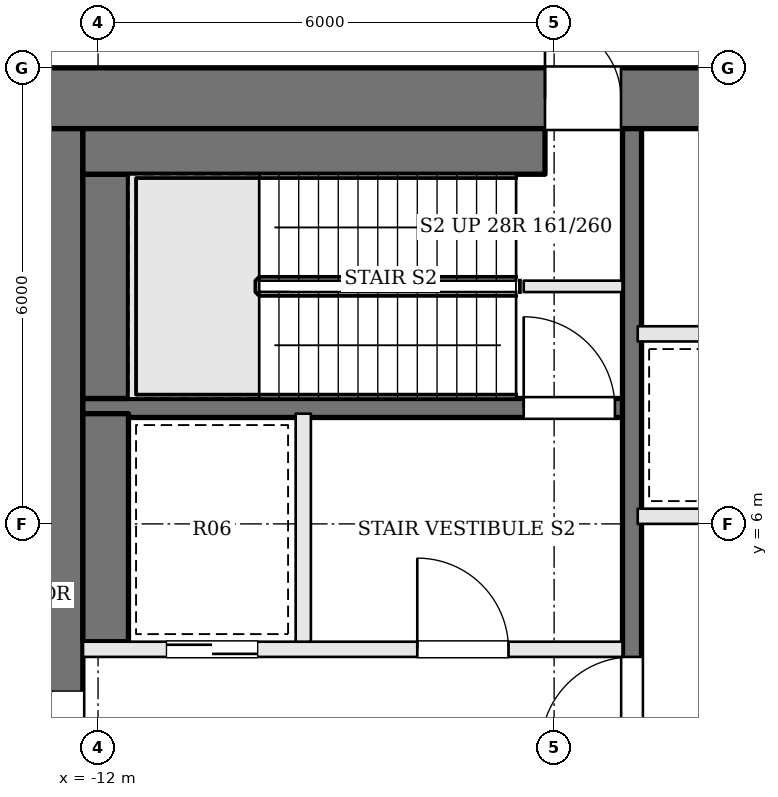
"""IFC4 building model, lengths in metres.
Left out: names, types, materials, properties, quantities, classifications, styles, units other than length and angle.
Written with IfcOpenShell. Run it as: python <this file> out.ifc"""

import sys

from ifc_helpers import new_model, si_unit, direction, frame, frame_2d, origin, place, context, subcontext, project, spatial, rectangle, extrude, element, fill, save


model = new_model("IFC4")
c1 = context("Model", 3, precision=1e-05, world=origin(), true_north=direction((0.0, 1.0)))
c2 = subcontext(c1, "Body", "Model", "MODEL_VIEW")
j1 = project(units=[si_unit("LENGTHUNIT", "METRE"), si_unit("PLANEANGLEUNIT", "RADIAN")], contexts=[c1])
p1 = place(None, origin())
s1 = spatial("IfcSite", under=j1, at=p1, CompositionType="ELEMENT")
p2 = place(p1, origin())
s2 = spatial("IfcBuilding", under=s1, at=p2, CompositionType="ELEMENT")
p3 = place(p2, frame((0.0, 0.0, 216.9)))
s3 = spatial("IfcBuildingStorey", under=s2, at=p3, CompositionType="ELEMENT", Elevation=216.9)
p4 = place(p3, frame((-13.0, 11.6, 0.0), z_axis=(0.0, 0.0, 1.0), x_axis=(1.0, 0.0, 0.0)))
e1 = element("IfcWall", 1, at=p4, inside=s3, PredefinedType="SHEAR", context=c2, shape_type="SweptSolid", body=[
    extrude(rectangle(XDim=26.0, YDim=0.8, at=frame_2d((13.0, 0.0))), origin(), (0.0, 0.0, 1.0), 4.5),
])
p5 = place(p4, frame((8.975, 0.0, 0.0)))
e2 = element("IfcOpeningElement", 2, at=p5, cuts=e1, PredefinedType="OPENING", context=c2, shape_type="SweptSolid", body=[
    extrude(rectangle(XDim=0.7, YDim=2.1, at=frame_2d((0.35, 1.05))), frame((0.0, 0.41, 0.0), z_axis=(0.0, -1.0, 0.0), x_axis=(1.0, 0.0, 0.0)), (0.0, 0.0, 1.0), 0.82),
])
p6 = place(p4, frame((11.575, 0.0, 0.0)))
e3 = element("IfcOpeningElement", 3, at=p6, cuts=e1, PredefinedType="OPENING", context=c2, shape_type="SweptSolid", body=[
    extrude(rectangle(XDim=1.2, YDim=2.1, at=frame_2d((0.6, 1.05))), frame((0.0, 0.41, 0.0), z_axis=(0.0, -1.0, 0.0), x_axis=(1.0, 0.0, 0.0)), (0.0, 0.0, 1.0), 0.82),
])
p7 = place(p4, frame((14.675, 0.0, 0.0)))
e4 = element("IfcOpeningElement", 4, at=p7, cuts=e1, PredefinedType="OPENING", context=c2, shape_type="SweptSolid", body=[
    extrude(rectangle(XDim=0.7, YDim=2.1, at=frame_2d((0.35, 1.05))), frame((0.0, 0.41, 0.0), z_axis=(0.0, -1.0, 0.0), x_axis=(1.0, 0.0, 0.0)), (0.0, 0.0, 1.0), 0.82),
])
p8 = place(p4, frame((16.725, 0.0, 0.0)))
e5 = element("IfcOpeningElement", 5, at=p8, cuts=e1, PredefinedType="OPENING", context=c2, shape_type="SweptSolid", body=[
    extrude(rectangle(XDim=0.7, YDim=2.1, at=frame_2d((0.35, 1.05))), frame((0.0, 0.41, 0.0), z_axis=(0.0, -1.0, 0.0), x_axis=(1.0, 0.0, 0.0)), (0.0, 0.0, 1.0), 0.82),
])
p9 = place(p4, frame((6.88, 0.0, 0.0)))
e6 = element("IfcOpeningElement", 6, at=p9, cuts=e1, PredefinedType="OPENING", context=c2, shape_type="SweptSolid", body=[
    extrude(rectangle(XDim=1.0, YDim=2.1, at=frame_2d((0.5, 1.05))), frame((0.0, 0.41, 0.0), z_axis=(0.0, -1.0, 0.0), x_axis=(1.0, 0.0, 0.0)), (0.0, 0.0, 1.0), 0.82),
])
p10 = place(p4, frame((18.12, 0.0, 0.0)))
e7 = element("IfcOpeningElement", 7, at=p10, cuts=e1, PredefinedType="OPENING", context=c2, shape_type="SweptSolid", body=[
    extrude(rectangle(XDim=1.0, YDim=2.1, at=frame_2d((0.5, 1.05))), frame((0.0, 0.41, 0.0), z_axis=(0.0, -1.0, 0.0), x_axis=(1.0, 0.0, 0.0)), (0.0, 0.0, 1.0), 0.82),
])
p11 = place(p3, frame((-12.6, -2.2, 0.0), z_axis=(0.0, 0.0, 1.0), x_axis=(0.0, 1.0, 0.0)))
e8 = element("IfcWall", 8, at=p11, inside=s3, PredefinedType="SHEAR", context=c2, shape_type="SweptSolid", body=[
    extrude(rectangle(XDim=13.4, YDim=0.8, at=frame_2d((6.7, 0.0))), origin(), (0.0, 0.0, 1.0), 4.5),
])
p12 = place(p11, frame((4.2, 0.0, 0.0)))
e9 = element("IfcOpeningElement", 9, at=p12, cuts=e8, PredefinedType="OPENING", context=c2, shape_type="SweptSolid", body=[
    extrude(rectangle(XDim=1.8, YDim=2.1, at=frame_2d((0.9, 1.05))), frame((0.0, 0.41, 0.0), z_axis=(0.0, -1.0, 0.0), x_axis=(1.0, 0.0, 0.0)), (0.0, 0.0, 1.0), 0.82),
])
p13 = place(p3, frame((-6.4, 9.125, 0.0), z_axis=(0.0, 0.0, 1.0), x_axis=(1.0, 0.0, 0.0)))
e10 = element("IfcWall", 10, at=p13, inside=s3, PredefinedType="SOLIDWALL", context=c2, shape_type="SweptSolid", body=[
    extrude(rectangle(XDim=1.3, YDim=0.15, at=frame_2d((0.65, 0.0))), origin(), (0.0, 0.0, 1.0), 4.3),
])
p14 = place(p3, frame((-12.2, 4.35, 0.0), z_axis=(0.0, 0.0, 1.0), x_axis=(1.0, 0.0, 0.0)))
e11 = element("IfcWall", 11, at=p14, inside=s3, PredefinedType="SOLIDWALL", context=c2, shape_type="SweptSolid", body=[
    extrude(rectangle(XDim=7.1, YDim=0.2, at=frame_2d((3.55, 0.0))), origin(), (0.0, 0.0, 1.0), 4.3),
])
p15 = place(p14, frame((4.4, 0.0, 0.0)))
e12 = element("IfcOpeningElement", 12, at=p15, cuts=e11, PredefinedType="OPENING", context=c2, shape_type="SweptSolid", body=[
    extrude(rectangle(XDim=1.2, YDim=2.1, at=frame_2d((0.6, 1.05))), frame((0.0, 0.11, 0.0), z_axis=(0.0, -1.0, 0.0), x_axis=(1.0, 0.0, 0.0)), (0.0, 0.0, 1.0), 0.22),
])
p16 = place(p14, frame((1.1, 0.0, 0.0)))
e13 = element("IfcOpeningElement", 13, at=p16, cuts=e11, PredefinedType="OPENING", context=c2, shape_type="SweptSolid", body=[
    extrude(rectangle(XDim=1.2, YDim=2.1, at=frame_2d((0.6, 1.05))), frame((0.0, 0.11, 0.0), z_axis=(0.0, -1.0, 0.0), x_axis=(1.0, 0.0, 0.0)), (0.0, 0.0, 1.0), 0.22),
])
p17 = place(p3, frame((-12.2, 7.525, 0.0), z_axis=(0.0, 0.0, 1.0), x_axis=(1.0, 0.0, 0.0)))
e14 = element("IfcWall", 14, at=p17, inside=s3, PredefinedType="SOLIDWALL", context=c2, shape_type="SweptSolid", body=[
    extrude(rectangle(XDim=7.1, YDim=0.25, at=frame_2d((3.55, 0.0))), origin(), (0.0, 0.0, 1.0), 4.3),
])
p18 = place(p17, frame((5.8, 0.0, 0.0)))
e15 = element("IfcOpeningElement", 15, at=p18, cuts=e14, PredefinedType="OPENING", context=c2, shape_type="SweptSolid", body=[
    extrude(rectangle(XDim=1.2, YDim=2.1, at=frame_2d((0.6, 1.05))), frame((0.0, 0.135, 0.0), z_axis=(0.0, -1.0, 0.0), x_axis=(1.0, 0.0, 0.0)), (0.0, 0.0, 1.0), 0.27),
])
p19 = place(p3, frame((-9.3, 4.45, 0.0), z_axis=(0.0, 0.0, 1.0), x_axis=(0.0, 1.0, 0.0)))
e16 = element("IfcWall", 16, at=p19, inside=s3, PredefinedType="SOLIDWALL", context=c2, shape_type="SweptSolid", body=[
    extrude(rectangle(XDim=3.0, YDim=0.2, at=frame_2d((1.5, 0.0))), origin(), (0.0, 0.0, 1.0), 4.3),
])
p20 = place(p3, frame((-4.975, -2.2, 0.0), z_axis=(0.0, 0.0, 1.0), x_axis=(0.0, 1.0, 0.0)))
e17 = element("IfcWall", 17, at=p20, inside=s3, PredefinedType="SOLIDWALL", context=c2, shape_type="SweptSolid", body=[
    extrude(rectangle(XDim=13.4, YDim=0.25, at=frame_2d((6.7, 0.0))), origin(), (0.0, 0.0, 1.0), 4.3),
])
p21 = place(p20, frame((5.25, 0.0, 0.0)))
e18 = element("IfcOpeningElement", 18, at=p21, cuts=e17, PredefinedType="OPENING", context=c2, shape_type="SweptSolid", body=[
    extrude(rectangle(XDim=1.2, YDim=2.1, at=frame_2d((0.6, 1.05))), frame((0.0, 0.135, 0.0), z_axis=(0.0, -1.0, 0.0), x_axis=(1.0, 0.0, 0.0)), (0.0, 0.0, 1.0), 0.27),
])
p22 = place(p3, frame((-11.9, 4.45, 0.0), z_axis=(0.0, 0.0, 1.0), x_axis=(0.0, 1.0, 0.0)))
e19 = element("IfcWall", 19, at=p22, inside=s3, PredefinedType="SOLIDWALL", context=c2, shape_type="SweptSolid", body=[
    extrude(rectangle(XDim=3.0, YDim=0.6, at=frame_2d((1.5, 0.0))), origin(), (0.0, 0.0, 1.0), 4.3),
])
p23 = place(p3, frame((-11.9, 7.65, 0.0), z_axis=(0.0, 0.0, 1.0), x_axis=(0.0, 1.0, 0.0)))
e20 = element("IfcWall", 20, at=p23, inside=s3, PredefinedType="SOLIDWALL", context=c2, shape_type="SweptSolid", body=[
    extrude(rectangle(XDim=2.95, YDim=0.6, at=frame_2d((1.475, 0.0))), origin(), (0.0, 0.0, 1.0), 4.3),
])
p24 = place(p3, frame((-12.2, 10.9, 0.0), z_axis=(0.0, 0.0, 1.0), x_axis=(1.0, 0.0, 0.0)))
e21 = element("IfcWall", 21, at=p24, inside=s3, PredefinedType="SOLIDWALL", context=c2, shape_type="SweptSolid", body=[
    extrude(rectangle(XDim=6.08, YDim=0.6, at=frame_2d((3.04, 0.0))), origin(), (0.0, 0.0, 1.0), 4.3),
])
for number, where, z_axis, x_axis in (
    (22, (-4.9, 6.1, 0.0), (0.0, 0.0, 1.0), (1.0, 0.0, 0.0)),
    (23, (-4.9, 8.5, 0.0), (0.0, 0.0, 1.0), (1.0, 0.0, 0.0)),
):
    element("IfcWall", number, at=place(p3, frame(where, z_axis=z_axis, x_axis=x_axis)), inside=s3, PredefinedType="SOLIDWALL", context=c2, shape_type="SweptSolid", body=[
        extrude(rectangle(XDim=9.8, YDim=0.2, at=frame_2d((4.9, 0.0))), origin(), (0.0, 0.0, 1.0), 4.3),
    ])
p25 = place(p12, origin())
e24 = element("IfcDoor", 24, at=p25, inside=s3, OperationType="DOUBLE_DOOR_SINGLE_SWING", PredefinedType="DOOR", context=c2, shape_type="SweptSolid", body=[
    extrude(rectangle(XDim=1.8, YDim=2.1, at=frame_2d((0.9, 1.05))), frame((0.0, 0.025, 0.0), z_axis=(0.0, -1.0, 0.0), x_axis=(1.0, 0.0, 0.0)), (0.0, 0.0, 1.0), 0.05),
])
fill(e9, e24)
p26 = place(p21, origin())
e25 = element("IfcDoor", 25, at=p26, inside=s3, OperationType="SINGLE_SWING_LEFT", PredefinedType="DOOR", context=c2, shape_type="SweptSolid", body=[
    extrude(rectangle(XDim=1.2, YDim=2.1, at=frame_2d((0.6, 1.05))), frame((0.0, 0.025, 0.0), z_axis=(0.0, -1.0, 0.0), x_axis=(1.0, 0.0, 0.0)), (0.0, 0.0, 1.0), 0.05),
])
fill(e18, e25)
p27 = place(p15, origin())
e26 = element("IfcDoor", 26, at=p27, inside=s3, OperationType="SINGLE_SWING_LEFT", PredefinedType="DOOR", context=c2, shape_type="SweptSolid", body=[
    extrude(rectangle(XDim=1.2, YDim=2.1, at=frame_2d((0.6, 1.05))), frame((0.0, 0.025, 0.0), z_axis=(0.0, -1.0, 0.0), x_axis=(1.0, 0.0, 0.0)), (0.0, 0.0, 1.0), 0.05),
])
fill(e12, e26)
p28 = place(p18, origin())
e27 = element("IfcDoor", 27, at=p28, inside=s3, OperationType="SINGLE_SWING_LEFT", PredefinedType="DOOR", context=c2, shape_type="SweptSolid", body=[
    extrude(rectangle(XDim=1.2, YDim=2.1, at=frame_2d((0.6, 1.05))), frame((0.0, 0.025, 0.0), z_axis=(0.0, -1.0, 0.0), x_axis=(1.0, 0.0, 0.0)), (0.0, 0.0, 1.0), 0.05),
])
fill(e15, e27)
p29 = place(p16, origin())
e28 = element("IfcDoor", 28, at=p29, inside=s3, OperationType="SLIDING_TO_RIGHT", PredefinedType="DOOR", context=c2, shape_type="SweptSolid", body=[
    extrude(rectangle(XDim=1.2, YDim=2.1, at=frame_2d((0.6, 1.05))), frame((0.0, 0.025, 0.0), z_axis=(0.0, -1.0, 0.0), x_axis=(1.0, 0.0, 0.0)), (0.0, 0.0, 1.0), 0.05),
])
fill(e13, e28)
p30 = place(p9, origin())
e29 = element("IfcDoor", 29, at=p30, inside=s3, OperationType="SINGLE_SWING_LEFT", PredefinedType="DOOR", context=c2, shape_type="SweptSolid", body=[
    extrude(rectangle(XDim=1.0, YDim=2.1, at=frame_2d((0.5, 1.05))), frame((0.0, 0.025, 0.0), z_axis=(0.0, -1.0, 0.0), x_axis=(1.0, 0.0, 0.0)), (0.0, 0.0, 1.0), 0.05),
])
fill(e6, e29)
save(model, sys.argv[1])
